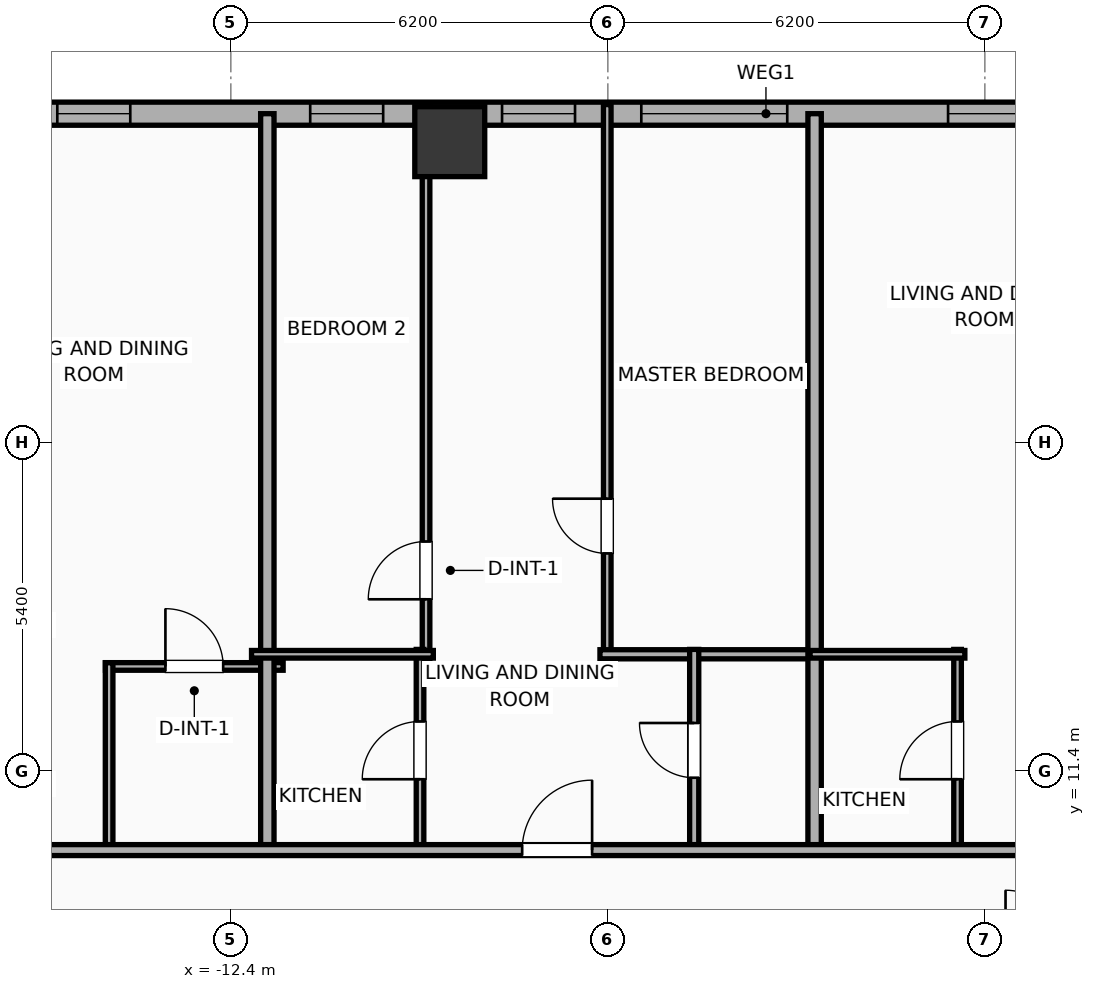
"""IFC4 building model, lengths in metres.
Left out: names, types, materials, properties, quantities, classifications, styles, units other than length and angle.
Written with IfcOpenShell. Run it as: python <this file> out.ifc"""

import sys

from ifc_helpers import new_model, si_unit, direction, frame, frame_2d, origin, origin_2d, place, context, subcontext, project, spatial, rectangle, hollow_rectangle, extrude, element, fill, save


model = new_model("IFC4")
c1 = context("Model", 3, precision=1e-05, world=origin(), true_north=direction((0.0, 1.0)))
c2 = subcontext(c1, "Body", "Model", "MODEL_VIEW")
j1 = project(units=[si_unit("LENGTHUNIT", "METRE"), si_unit("PLANEANGLEUNIT", "RADIAN")], contexts=[c1])
p1 = place(None, origin())
s1 = spatial("IfcSite", under=j1, at=p1, CompositionType="ELEMENT")
p2 = place(p1, origin())
s2 = spatial("IfcBuilding", under=s1, at=p2, CompositionType="ELEMENT")
p3 = place(p2, frame((0.0, 0.0, 68.9)))
s3 = spatial("IfcBuildingStorey", under=s2, at=p3, CompositionType="ELEMENT", Elevation=68.9)
p4 = place(p3, frame((-8.8, 21.75, 0.0), z_axis=(0.0, 0.0, 1.0), x_axis=(1.0, 0.0, 0.0)))
e1 = element("IfcColumn", 1, at=p4, inside=s3, PredefinedType="COLUMN", context=c2, shape_type="SweptSolid", body=[
    extrude(hollow_rectangle(XDim=1.15, YDim=1.15, WallThickness=0.04, at=origin_2d()), origin(), (0.0, 0.0, 1.0), 3.9),
])
p5 = place(p3, frame((-29.581, 22.21, 0.0), z_axis=(0.0, 0.0, 1.0), x_axis=(1.0, 0.0, 0.0)))
e2 = element("IfcWall", 2, at=p5, inside=s3, PredefinedType="ELEMENTEDWALL", context=c2, shape_type="SweptSolid", body=[
    extrude(rectangle(XDim=51.963, YDim=0.38, at=frame_2d((25.981, 0.0))), origin(), (0.0, 0.0, 1.0), 3.65),
])
p6 = place(p5, frame((5.81, 0.0, 0.75)))
e3 = element("IfcOpeningElement", 3, at=p6, cuts=e2, PredefinedType="OPENING", context=c2, shape_type="SweptSolid", body=[
    extrude(rectangle(XDim=2.4, YDim=2.1, at=frame_2d((1.2, 1.05))), frame((0.0, 0.2, 0.0), z_axis=(0.0, -1.0, 0.0), x_axis=(1.0, 0.0, 0.0)), (0.0, 0.0, 1.0), 0.4),
])
p7 = place(p5, frame((23.931, 0.0, 0.75)))
e4 = element("IfcOpeningElement", 4, at=p7, cuts=e2, PredefinedType="OPENING", context=c2, shape_type="SweptSolid", body=[
    extrude(rectangle(XDim=2.4, YDim=2.1, at=frame_2d((1.2, 1.05))), frame((0.0, 0.2, 0.0), z_axis=(0.0, -1.0, 0.0), x_axis=(1.0, 0.0, 0.0)), (0.0, 0.0, 1.0), 0.4),
])
p8 = place(p5, frame((3.056, 0.0, 0.75)))
e5 = element("IfcOpeningElement", 5, at=p8, cuts=e2, PredefinedType="OPENING", context=c2, shape_type="SweptSolid", body=[
    extrude(rectangle(XDim=1.2, YDim=2.05, at=frame_2d((0.6, 1.025))), frame((0.0, 0.2, 0.0), z_axis=(0.0, -1.0, 0.0), x_axis=(1.0, 0.0, 0.0)), (0.0, 0.0, 1.0), 0.4),
])
p9 = place(p5, frame((11.127, 0.0, 0.75)))
e6 = element("IfcOpeningElement", 6, at=p9, cuts=e2, PredefinedType="OPENING", context=c2, shape_type="SweptSolid", body=[
    extrude(rectangle(XDim=0.52, YDim=2.05, at=frame_2d((0.26, 1.025))), frame((0.0, 0.2, 0.0), z_axis=(0.0, -1.0, 0.0), x_axis=(1.0, 0.0, 0.0)), (0.0, 0.0, 1.0), 0.4),
])
p10 = place(p5, frame((14.327, 0.0, 0.75)))
e7 = element("IfcOpeningElement", 7, at=p10, cuts=e2, PredefinedType="OPENING", context=c2, shape_type="SweptSolid", body=[
    extrude(rectangle(XDim=1.2, YDim=2.05, at=frame_2d((0.6, 1.025))), frame((0.0, 0.2, 0.0), z_axis=(0.0, -1.0, 0.0), x_axis=(1.0, 0.0, 0.0)), (0.0, 0.0, 1.0), 0.4),
])
p11 = place(p5, frame((21.641, 0.0, 0.75)))
e8 = element("IfcOpeningElement", 8, at=p11, cuts=e2, PredefinedType="OPENING", context=c2, shape_type="SweptSolid", body=[
    extrude(rectangle(XDim=1.2, YDim=2.05, at=frame_2d((0.6, 1.025))), frame((0.0, 0.2, 0.0), z_axis=(0.0, -1.0, 0.0), x_axis=(1.0, 0.0, 0.0)), (0.0, 0.0, 1.0), 0.4),
])
p12 = place(p5, frame((18.486, 0.0, 0.75)))
e9 = element("IfcOpeningElement", 9, at=p12, cuts=e2, PredefinedType="OPENING", context=c2, shape_type="SweptSolid", body=[
    extrude(rectangle(XDim=1.2, YDim=2.05, at=frame_2d((0.6, 1.025))), frame((0.0, 0.2, 0.0), z_axis=(0.0, -1.0, 0.0), x_axis=(1.0, 0.0, 0.0)), (0.0, 0.0, 1.0), 0.4),
])
p13 = place(p5, frame((28.976, 0.0, 0.75)))
e10 = element("IfcOpeningElement", 10, at=p13, cuts=e2, PredefinedType="OPENING", context=c2, shape_type="SweptSolid", body=[
    extrude(rectangle(XDim=1.2, YDim=2.05, at=frame_2d((0.6, 1.025))), frame((0.0, 0.2, 0.0), z_axis=(0.0, -1.0, 0.0), x_axis=(1.0, 0.0, 0.0)), (0.0, 0.0, 1.0), 0.4),
])
p14 = place(p5, frame((33.476, 0.0, 0.75)))
e11 = element("IfcOpeningElement", 11, at=p14, cuts=e2, PredefinedType="OPENING", context=c2, shape_type="SweptSolid", body=[
    extrude(rectangle(XDim=1.2, YDim=2.05, at=frame_2d((0.6, 1.025))), frame((0.0, 0.2, 0.0), z_axis=(0.0, -1.0, 0.0), x_axis=(1.0, 0.0, 0.0)), (0.0, 0.0, 1.0), 0.4),
])
p15 = place(p5, frame((36.752, 0.0, 0.75)))
e12 = element("IfcOpeningElement", 12, at=p15, cuts=e2, PredefinedType="OPENING", context=c2, shape_type="SweptSolid", body=[
    extrude(rectangle(XDim=1.2, YDim=2.05, at=frame_2d((0.6, 1.025))), frame((0.0, 0.2, 0.0), z_axis=(0.0, -1.0, 0.0), x_axis=(1.0, 0.0, 0.0)), (0.0, 0.0, 1.0), 0.4),
])
p16 = place(p5, frame((42.452, 0.0, 0.75)))
e13 = element("IfcOpeningElement", 13, at=p16, cuts=e2, PredefinedType="OPENING", context=c2, shape_type="SweptSolid", body=[
    extrude(rectangle(XDim=1.2, YDim=2.05, at=frame_2d((0.6, 1.025))), frame((0.0, 0.2, 0.0), z_axis=(0.0, -1.0, 0.0), x_axis=(1.0, 0.0, 0.0)), (0.0, 0.0, 1.0), 0.4),
])
p17 = place(p5, frame((45.831, 0.0, 0.75)))
e14 = element("IfcOpeningElement", 14, at=p17, cuts=e2, PredefinedType="OPENING", context=c2, shape_type="SweptSolid", body=[
    extrude(rectangle(XDim=1.2, YDim=2.05, at=frame_2d((0.6, 1.025))), frame((0.0, 0.2, 0.0), z_axis=(0.0, -1.0, 0.0), x_axis=(1.0, 0.0, 0.0)), (0.0, 0.0, 1.0), 0.4),
])
p18 = place(p5, frame((48.585, 0.0, 0.75)))
e15 = element("IfcOpeningElement", 15, at=p18, cuts=e2, PredefinedType="OPENING", context=c2, shape_type="SweptSolid", body=[
    extrude(rectangle(XDim=1.2, YDim=2.05, at=frame_2d((0.6, 1.025))), frame((0.0, 0.2, 0.0), z_axis=(0.0, -1.0, 0.0), x_axis=(1.0, 0.0, 0.0)), (0.0, 0.0, 1.0), 0.4),
])
p19 = place(p5, frame((50.421, 0.0, 0.75)))
e16 = element("IfcOpeningElement", 16, at=p19, cuts=e2, PredefinedType="OPENING", context=c2, shape_type="SweptSolid", body=[
    extrude(rectangle(XDim=0.52, YDim=2.05, at=frame_2d((0.26, 1.025))), frame((0.0, 0.2, 0.0), z_axis=(0.0, -1.0, 0.0), x_axis=(1.0, 0.0, 0.0)), (0.0, 0.0, 1.0), 0.4),
])
p20 = place(p3, frame((-14.462, 13.12, 0.0), z_axis=(0.0, 0.0, 1.0), x_axis=(1.0, 0.0, 0.0)))
e17 = element("IfcWall", 17, at=p20, inside=s3, PredefinedType="PARTITIONING", context=c2, shape_type="SweptSolid", body=[
    extrude(rectangle(XDim=2.922, YDim=0.125, at=frame_2d((1.461, 0.0))), origin(), (0.0, 0.0, 1.0), 3.65),
])
p21 = place(p20, frame((0.986, 0.0, 0.0)))
e18 = element("IfcOpeningElement", 18, at=p21, cuts=e17, PredefinedType="OPENING", context=c2, shape_type="SweptSolid", body=[
    extrude(rectangle(XDim=0.95, YDim=2.05, at=frame_2d((0.475, 1.025))), frame((0.0, 0.073, 0.0), z_axis=(0.0, -1.0, 0.0), x_axis=(1.0, 0.0, 0.0)), (0.0, 0.0, 1.0), 0.145),
])
p22 = place(p3, frame((-14.402, 10.08, 0.0), z_axis=(0.0, 0.0, 1.0), x_axis=(0.0, 1.0, 0.0)))
e19 = element("IfcWall", 19, at=p22, inside=s3, PredefinedType="PARTITIONING", context=c2, shape_type="SweptSolid", body=[
    extrude(rectangle(XDim=3.1, YDim=0.125, at=frame_2d((1.55, 0.0))), origin(), (0.0, 0.0, 1.0), 3.65),
])
p23 = place(p3, frame((-11.8, 10.02, 0.0), z_axis=(0.0, 0.0, 1.0), x_axis=(0.0, 1.0, 0.0)))
e20 = element("IfcWall", 20, at=p23, inside=s3, PredefinedType="PARTITIONING", context=c2, shape_type="SweptSolid", body=[
    extrude(rectangle(XDim=12.19, YDim=0.22, at=frame_2d((6.095, 0.0))), origin(), (0.0, 0.0, 1.0), 2.94),
])
p24 = place(p3, frame((-9.19, 13.24, 0.0), z_axis=(0.0, 0.0, 1.0), x_axis=(0.0, 1.0, 0.0)))
e21 = element("IfcWall", 21, at=p24, inside=s3, PredefinedType="PARTITIONING", context=c2, shape_type="SweptSolid", body=[
    extrude(rectangle(XDim=9.12, YDim=0.125, at=frame_2d((4.56, 0.0))), origin(), (0.0, 0.0, 1.0), 2.94),
])
p25 = place(p24, frame((0.984, 0.0, 0.0)))
e22 = element("IfcOpeningElement", 22, at=p25, cuts=e21, PredefinedType="OPENING", context=c2, shape_type="SweptSolid", body=[
    extrude(rectangle(XDim=0.95, YDim=2.05, at=frame_2d((0.475, 1.025))), frame((0.0, 0.073, 0.0), z_axis=(0.0, -1.0, 0.0), x_axis=(1.0, 0.0, 0.0)), (0.0, 0.0, 1.0), 0.145),
])
p26 = place(p3, frame((-6.21, 13.24, 0.0), z_axis=(0.0, 0.0, 1.0), x_axis=(0.0, 1.0, 0.0)))
e23 = element("IfcWall", 23, at=p26, inside=s3, PredefinedType="PARTITIONING", context=c2, shape_type="SweptSolid", body=[
    extrude(rectangle(XDim=9.12, YDim=0.125, at=frame_2d((4.56, 0.0))), origin(), (0.0, 0.0, 1.0), 3.65),
])
p27 = place(p26, frame((1.739, 0.0, 0.0)))
e24 = element("IfcOpeningElement", 24, at=p27, cuts=e23, PredefinedType="OPENING", context=c2, shape_type="SweptSolid", body=[
    extrude(rectangle(XDim=0.9, YDim=2.05, at=frame_2d((0.45, 1.025))), frame((0.0, 0.073, 0.0), z_axis=(0.0, -1.0, 0.0), x_axis=(1.0, 0.0, 0.0)), (0.0, 0.0, 1.0), 0.145),
])
p28 = place(p3, frame((-6.33, 13.32, 0.0), z_axis=(0.0, 0.0, 1.0), x_axis=(1.0, 0.0, 0.0)))
e25 = element("IfcWall", 25, at=p28, inside=s3, PredefinedType="PLUMBINGWALL", context=c2, shape_type="SweptSolid", body=[
    extrude(rectangle(XDim=3.605, YDim=0.15, at=frame_2d((1.802, 0.0))), origin(), (0.0, 0.0, 1.0), 3.65),
])
p29 = place(p3, frame((-9.289, 10.08, 0.0), z_axis=(0.0, 0.0, 1.0), x_axis=(0.0, 1.0, 0.0)))
e26 = element("IfcWall", 26, at=p29, inside=s3, PredefinedType="PARTITIONING", context=c2, shape_type="SweptSolid", body=[
    extrude(rectangle(XDim=3.32, YDim=0.125, at=frame_2d((1.66, 0.0))), origin(), (0.0, 0.0, 1.0), 3.65),
])
p30 = place(p29, frame((1.185, 0.0, 0.0)))
e27 = element("IfcOpeningElement", 27, at=p30, cuts=e26, PredefinedType="OPENING", context=c2, shape_type="SweptSolid", body=[
    extrude(rectangle(XDim=0.95, YDim=2.05, at=frame_2d((0.475, 1.025))), frame((0.0, 0.073, 0.0), z_axis=(0.0, -1.0, 0.0), x_axis=(1.0, 0.0, 0.0)), (0.0, 0.0, 1.0), 0.145),
])
p31 = place(p3, frame((-12.06, 13.32, 0.0), z_axis=(0.0, 0.0, 1.0), x_axis=(1.0, 0.0, 0.0)))
e28 = element("IfcWall", 28, at=p31, inside=s3, PredefinedType="PARTITIONING", context=c2, shape_type="SweptSolid", body=[
    extrude(rectangle(XDim=2.99, YDim=0.125, at=frame_2d((1.495, 0.0))), origin(), (0.0, 0.0, 1.0), 3.65),
])
p32 = place(p3, frame((-4.78, 10.08, 0.0), z_axis=(0.0, 0.0, 1.0), x_axis=(0.0, 1.0, 0.0)))
e29 = element("IfcWall", 29, at=p32, inside=s3, PredefinedType="PLUMBINGWALL", context=c2, shape_type="SweptSolid", body=[
    extrude(rectangle(XDim=3.32, YDim=0.15, at=frame_2d((1.66, 0.0))), origin(), (0.0, 0.0, 1.0), 3.65),
])
p33 = place(p32, frame((1.21, 0.0, 0.0)))
e30 = element("IfcOpeningElement", 30, at=p33, cuts=e29, PredefinedType="OPENING", context=c2, shape_type="SweptSolid", body=[
    extrude(rectangle(XDim=0.9, YDim=2.05, at=frame_2d((0.45, 1.025))), frame((0.0, 0.085, 0.0), z_axis=(0.0, -1.0, 0.0), x_axis=(1.0, 0.0, 0.0)), (0.0, 0.0, 1.0), 0.17),
])
p34 = place(p3, frame((-2.8, 10.02, 0.0), z_axis=(0.0, 0.0, 1.0), x_axis=(0.0, 1.0, 0.0)))
e31 = element("IfcWall", 31, at=p34, inside=s3, PredefinedType="PARTITIONING", context=c2, shape_type="SweptSolid", body=[
    extrude(rectangle(XDim=12.19, YDim=0.22, at=frame_2d((6.095, 0.0))), origin(), (0.0, 0.0, 1.0), 3.65),
])
p35 = place(p3, frame((-0.449, 10.08, 0.0), z_axis=(0.0, 0.0, 1.0), x_axis=(0.0, 1.0, 0.0)))
e32 = element("IfcWall", 32, at=p35, inside=s3, PredefinedType="PARTITIONING", context=c2, shape_type="SweptSolid", body=[
    extrude(rectangle(XDim=3.32, YDim=0.125, at=frame_2d((1.66, 0.0))), origin(), (0.0, 0.0, 1.0), 3.65),
])
p36 = place(p35, frame((1.185, 0.0, 0.0)))
e33 = element("IfcOpeningElement", 33, at=p36, cuts=e32, PredefinedType="OPENING", context=c2, shape_type="SweptSolid", body=[
    extrude(rectangle(XDim=0.95, YDim=2.05, at=frame_2d((0.475, 1.025))), frame((0.0, 0.073, 0.0), z_axis=(0.0, -1.0, 0.0), x_axis=(1.0, 0.0, 0.0)), (0.0, 0.0, 1.0), 0.145),
])
p37 = place(p3, frame((-2.875, 13.32, 0.0), z_axis=(0.0, 0.0, 1.0), x_axis=(1.0, 0.0, 0.0)))
e34 = element("IfcWall", 34, at=p37, inside=s3, PredefinedType="PARTITIONING", context=c2, shape_type="SweptSolid", body=[
    extrude(rectangle(XDim=2.546, YDim=0.125, at=frame_2d((1.273, 0.0))), origin(), (0.0, 0.0, 1.0), 3.65),
])
p38 = place(p3, frame((-33.41, 10.1, 0.0), z_axis=(0.0, 0.0, 1.0), x_axis=(1.0, 0.0, 0.0)))
e35 = element("IfcWall", 35, at=p38, inside=s3, PredefinedType="PARTITIONING", context=c2, shape_type="SweptSolid", body=[
    extrude(rectangle(XDim=59.62, YDim=0.18, at=frame_2d((29.81, 0.0))), origin(), (0.0, 0.0, 1.0), 3.65),
])
p39 = place(p38, frame((2.793, 0.0, 0.0)))
e36 = element("IfcOpeningElement", 36, at=p39, cuts=e35, PredefinedType="OPENING", context=c2, shape_type="SweptSolid", body=[
    extrude(rectangle(XDim=0.9, YDim=2.05, at=frame_2d((0.45, 1.025))), frame((0.0, 0.1, 0.0), z_axis=(0.0, -1.0, 0.0), x_axis=(1.0, 0.0, 0.0)), (0.0, 0.0, 1.0), 0.2),
])
p40 = place(p38, frame((10.037, 0.0, 0.0)))
e37 = element("IfcOpeningElement", 37, at=p40, cuts=e35, PredefinedType="OPENING", context=c2, shape_type="SweptSolid", body=[
    extrude(rectangle(XDim=1.15, YDim=2.05, at=frame_2d((0.575, 1.025))), frame((0.0, 0.1, 0.0), z_axis=(0.0, -1.0, 0.0), x_axis=(1.0, 0.0, 0.0)), (0.0, 0.0, 1.0), 0.2),
])
p41 = place(p38, frame((16.882, 0.0, 0.0)))
e38 = element("IfcOpeningElement", 38, at=p41, cuts=e35, PredefinedType="OPENING", context=c2, shape_type="SweptSolid", body=[
    extrude(rectangle(XDim=1.15, YDim=2.05, at=frame_2d((0.575, 1.025))), frame((0.0, 0.1, 0.0), z_axis=(0.0, -1.0, 0.0), x_axis=(1.0, 0.0, 0.0)), (0.0, 0.0, 1.0), 0.2),
])
p42 = place(p38, frame((25.801, 0.0, 0.0)))
e39 = element("IfcOpeningElement", 39, at=p42, cuts=e35, PredefinedType="OPENING", context=c2, shape_type="SweptSolid", body=[
    extrude(rectangle(XDim=1.15, YDim=2.05, at=frame_2d((0.575, 1.025))), frame((0.0, 0.1, 0.0), z_axis=(0.0, -1.0, 0.0), x_axis=(1.0, 0.0, 0.0)), (0.0, 0.0, 1.0), 0.2),
])
p43 = place(p38, frame((34.72, 0.0, 0.0)))
e40 = element("IfcOpeningElement", 40, at=p43, cuts=e35, PredefinedType="OPENING", context=c2, shape_type="SweptSolid", body=[
    extrude(rectangle(XDim=1.15, YDim=2.05, at=frame_2d((0.575, 1.025))), frame((0.0, 0.1, 0.0), z_axis=(0.0, -1.0, 0.0), x_axis=(1.0, 0.0, 0.0)), (0.0, 0.0, 1.0), 0.2),
])
p44 = place(p38, frame((43.771, 0.0, 0.0)))
e41 = element("IfcOpeningElement", 41, at=p44, cuts=e35, PredefinedType="OPENING", context=c2, shape_type="SweptSolid", body=[
    extrude(rectangle(XDim=1.15, YDim=2.05, at=frame_2d((0.575, 1.025))), frame((0.0, 0.1, 0.0), z_axis=(0.0, -1.0, 0.0), x_axis=(1.0, 0.0, 0.0)), (0.0, 0.0, 1.0), 0.2),
])
p45 = place(p38, frame((49.715, 0.0, 0.0)))
e42 = element("IfcOpeningElement", 42, at=p45, cuts=e35, PredefinedType="OPENING", context=c2, shape_type="SweptSolid", body=[
    extrude(rectangle(XDim=1.15, YDim=2.05, at=frame_2d((0.575, 1.025))), frame((0.0, 0.1, 0.0), z_axis=(0.0, -1.0, 0.0), x_axis=(1.0, 0.0, 0.0)), (0.0, 0.0, 1.0), 0.2),
])
p46 = place(p38, frame((56.654, 0.0, 0.0)))
e43 = element("IfcOpeningElement", 43, at=p46, cuts=e35, PredefinedType="OPENING", context=c2, shape_type="SweptSolid", body=[
    extrude(rectangle(XDim=0.9, YDim=2.05, at=frame_2d((0.45, 1.025))), frame((0.0, 0.1, 0.0), z_axis=(0.0, -1.0, 0.0), x_axis=(1.0, 0.0, 0.0)), (0.0, 0.0, 1.0), 0.2),
])
p47 = place(p7, origin())
e44 = element("IfcWindow", 44, at=p47, inside=s3, PartitioningType="SINGLE_PANEL", PredefinedType="WINDOW", context=c2, shape_type="SweptSolid", body=[
    extrude(rectangle(XDim=2.4, YDim=2.1, at=frame_2d((1.2, 1.05))), frame((0.0, 0.03, 0.0), z_axis=(0.0, -1.0, 0.0), x_axis=(1.0, 0.0, 0.0)), (0.0, 0.0, 1.0), 0.06),
])
fill(e4, e44)
p48 = place(p10, origin())
e45 = element("IfcWindow", 45, at=p48, inside=s3, PartitioningType="SINGLE_PANEL", PredefinedType="WINDOW", context=c2, shape_type="SweptSolid", body=[
    extrude(rectangle(XDim=1.2, YDim=2.05, at=frame_2d((0.6, 1.025))), frame((0.0, 0.03, 0.0), z_axis=(0.0, -1.0, 0.0), x_axis=(1.0, 0.0, 0.0)), (0.0, 0.0, 1.0), 0.06),
])
fill(e7, e45)
p49 = place(p11, origin())
e46 = element("IfcWindow", 46, at=p49, inside=s3, PartitioningType="SINGLE_PANEL", PredefinedType="WINDOW", context=c2, shape_type="SweptSolid", body=[
    extrude(rectangle(XDim=1.2, YDim=2.05, at=frame_2d((0.6, 1.025))), frame((0.0, 0.03, 0.0), z_axis=(0.0, -1.0, 0.0), x_axis=(1.0, 0.0, 0.0)), (0.0, 0.0, 1.0), 0.06),
])
fill(e8, e46)
p50 = place(p12, origin())
e47 = element("IfcWindow", 47, at=p50, inside=s3, PartitioningType="SINGLE_PANEL", PredefinedType="WINDOW", context=c2, shape_type="SweptSolid", body=[
    extrude(rectangle(XDim=1.2, YDim=2.05, at=frame_2d((0.6, 1.025))), frame((0.0, 0.03, 0.0), z_axis=(0.0, -1.0, 0.0), x_axis=(1.0, 0.0, 0.0)), (0.0, 0.0, 1.0), 0.06),
])
fill(e9, e47)
p51 = place(p13, origin())
e48 = element("IfcWindow", 48, at=p51, inside=s3, PartitioningType="SINGLE_PANEL", PredefinedType="WINDOW", context=c2, shape_type="SweptSolid", body=[
    extrude(rectangle(XDim=1.2, YDim=2.05, at=frame_2d((0.6, 1.025))), frame((0.0, 0.03, 0.0), z_axis=(0.0, -1.0, 0.0), x_axis=(1.0, 0.0, 0.0)), (0.0, 0.0, 1.0), 0.06),
])
fill(e10, e48)
p52 = place(p21, origin())
e49 = element("IfcDoor", 49, at=p52, inside=s3, OperationType="SINGLE_SWING_LEFT", PredefinedType="DOOR", context=c2, shape_type="SweptSolid", body=[
    extrude(rectangle(XDim=0.95, YDim=2.05, at=frame_2d((0.475, 1.025))), frame((0.0, 0.025, 0.0), z_axis=(0.0, -1.0, 0.0), x_axis=(1.0, 0.0, 0.0)), (0.0, 0.0, 1.0), 0.05),
])
fill(e18, e49)
p53 = place(p25, origin())
e50 = element("IfcDoor", 50, at=p53, inside=s3, OperationType="SINGLE_SWING_LEFT", PredefinedType="DOOR", context=c2, shape_type="SweptSolid", body=[
    extrude(rectangle(XDim=0.95, YDim=2.05, at=frame_2d((0.475, 1.025))), frame((0.0, 0.025, 0.0), z_axis=(0.0, -1.0, 0.0), x_axis=(1.0, 0.0, 0.0)), (0.0, 0.0, 1.0), 0.05),
])
fill(e22, e50)
p54 = place(p27, origin())
e51 = element("IfcDoor", 51, at=p54, inside=s3, OperationType="SINGLE_SWING_RIGHT", PredefinedType="DOOR", context=c2, shape_type="SweptSolid", body=[
    extrude(rectangle(XDim=0.9, YDim=2.05, at=frame_2d((0.45, 1.025))), frame((0.0, 0.025, 0.0), z_axis=(0.0, -1.0, 0.0), x_axis=(1.0, 0.0, 0.0)), (0.0, 0.0, 1.0), 0.05),
])
fill(e24, e51)
p55 = place(p30, origin())
e52 = element("IfcDoor", 52, at=p55, inside=s3, OperationType="SINGLE_SWING_LEFT", PredefinedType="DOOR", context=c2, shape_type="SweptSolid", body=[
    extrude(rectangle(XDim=0.95, YDim=2.05, at=frame_2d((0.475, 1.025))), frame((0.0, 0.025, 0.0), z_axis=(0.0, -1.0, 0.0), x_axis=(1.0, 0.0, 0.0)), (0.0, 0.0, 1.0), 0.05),
])
fill(e27, e52)
p56 = place(p33, origin())
e53 = element("IfcDoor", 53, at=p56, inside=s3, OperationType="SINGLE_SWING_RIGHT", PredefinedType="DOOR", context=c2, shape_type="SweptSolid", body=[
    extrude(rectangle(XDim=0.9, YDim=2.05, at=frame_2d((0.45, 1.025))), frame((0.0, 0.025, 0.0), z_axis=(0.0, -1.0, 0.0), x_axis=(1.0, 0.0, 0.0)), (0.0, 0.0, 1.0), 0.05),
])
fill(e30, e53)
p57 = place(p36, origin())
e54 = element("IfcDoor", 54, at=p57, inside=s3, OperationType="SINGLE_SWING_LEFT", PredefinedType="DOOR", context=c2, shape_type="SweptSolid", body=[
    extrude(rectangle(XDim=0.95, YDim=2.05, at=frame_2d((0.475, 1.025))), frame((0.0, 0.025, 0.0), z_axis=(0.0, -1.0, 0.0), x_axis=(1.0, 0.0, 0.0)), (0.0, 0.0, 1.0), 0.05),
])
fill(e33, e54)
p58 = place(p42, origin())
e55 = element("IfcDoor", 55, at=p58, inside=s3, OperationType="SINGLE_SWING_RIGHT", PredefinedType="DOOR", context=c2, shape_type="SweptSolid", body=[
    extrude(rectangle(XDim=1.15, YDim=2.05, at=frame_2d((0.575, 1.025))), frame((0.0, 0.025, 0.0), z_axis=(0.0, -1.0, 0.0), x_axis=(1.0, 0.0, 0.0)), (0.0, 0.0, 1.0), 0.05),
])
fill(e39, e55)
save(model, sys.argv[1])
